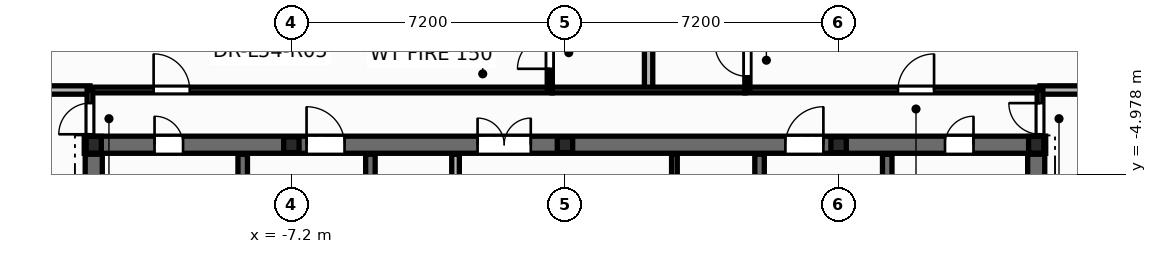
"""IFC4 building model, lengths in metres.
Left out: names, types, materials, properties, quantities, classifications, styles, units other than length and angle.
Written with IfcOpenShell. Run it as: python <this file> out.ifc"""

import sys

from ifc_helpers import new_model, si_unit, direction, frame, frame_2d, origin, origin_2d, place, context, subcontext, project, spatial, rectangle, i_section, extrude, element, fill, save


model = new_model("IFC4")
c1 = context("Model", 3, precision=1e-05, world=origin(), true_north=direction((0.0, 1.0)))
c2 = subcontext(c1, "Body", "Model", "MODEL_VIEW")
j1 = project(units=[si_unit("LENGTHUNIT", "METRE"), si_unit("PLANEANGLEUNIT", "RADIAN")], contexts=[c1])
p1 = place(None, origin())
s1 = spatial("IfcSite", under=j1, at=p1, CompositionType="ELEMENT")
p2 = place(p1, origin())
s2 = spatial("IfcBuilding", under=s1, at=p2, CompositionType="ELEMENT")
p3 = place(p2, frame((0.0, 0.0, 207.3)))
s3 = spatial("IfcBuildingStorey", under=s2, at=p3, CompositionType="ELEMENT", Elevation=207.3)
for number, where, z_axis, x_axis in (
    (1, (12.4, -4.2, 0.0), (0.0, 0.0, 1.0), (1.0, 0.0, 0.0)),
    (2, (-12.4, -4.2, 0.0), (0.0, 0.0, 1.0), (1.0, 0.0, 0.0)),
):
    element("IfcColumn", number, at=place(p3, frame(where, z_axis=z_axis, x_axis=x_axis)), inside=s3, PredefinedType="COLUMN", context=c2, shape_type="SweptSolid", body=[
        extrude(i_section(OverallWidth=0.4, OverallDepth=0.44, WebThickness=0.028, FlangeThickness=0.04, at=origin_2d()), origin(), (0.0, 0.0, 1.0), 3.6),
    ])
for number, where, z_axis, x_axis in (
    (3, (-7.2, -4.2, 0.0), (0.0, 0.0, 1.0), (1.0, 0.0, 0.0)),
    (4, (0.0, -4.2, 0.0), (0.0, 0.0, 1.0), (1.0, 0.0, 0.0)),
    (5, (7.2, -4.2, 0.0), (0.0, 0.0, 1.0), (1.0, 0.0, 0.0)),
):
    element("IfcColumn", number, at=place(p3, frame(where, z_axis=z_axis, x_axis=x_axis)), inside=s3, PredefinedType="PILASTER", context=c2, shape_type="SweptSolid", body=[
        extrude(i_section(OverallWidth=0.405, OverallDepth=0.414, WebThickness=0.022, FlangeThickness=0.032, at=origin_2d()), origin(), (0.0, 0.0, 1.0), 3.6),
    ])
p4 = place(p3, frame((2.88, -5.6, 0.0), z_axis=(0.0, 0.0, 1.0), x_axis=(0.0, 1.0, 0.0)))
e6 = element("IfcWall", 6, at=p4, inside=s3, PredefinedType="PARTITIONING", context=c2, shape_type="SweptSolid", body=[
    extrude(rectangle(XDim=1.15, YDim=0.15, at=frame_2d((0.575, 0.0))), origin(), (0.0, 0.0, 1.0), 3.345),
])
p5 = place(p3, frame((-12.65, -4.2, 0.0), z_axis=(0.0, 0.0, 1.0), x_axis=(1.0, 0.0, 0.0)))
e7 = element("IfcWall", 7, at=p5, inside=s3, PredefinedType="SHEAR", context=c2, shape_type="SweptSolid", body=[
    extrude(rectangle(XDim=25.3, YDim=0.45, at=frame_2d((12.65, 0.0))), origin(), (0.0, 0.0, 1.0), 3.6),
])
p6 = place(p5, frame((1.85, 0.0, 0.0)))
e8 = element("IfcOpeningElement", 8, at=p6, cuts=e7, PredefinedType="OPENING", context=c2, shape_type="SweptSolid", body=[
    extrude(rectangle(XDim=0.756, YDim=2.054, at=frame_2d((0.375, 1.027))), frame((0.0, 0.235, 0.0), z_axis=(0.0, -1.0, 0.0), x_axis=(1.0, 0.0, 0.0)), (0.0, 0.0, 1.0), 0.47),
])
p7 = place(p5, frame((22.65, 0.0, 0.0)))
e9 = element("IfcOpeningElement", 9, at=p7, cuts=e7, PredefinedType="OPENING", context=c2, shape_type="SweptSolid", body=[
    extrude(rectangle(XDim=0.756, YDim=2.054, at=frame_2d((0.375, 1.027))), frame((0.0, 0.235, 0.0), z_axis=(0.0, -1.0, 0.0), x_axis=(1.0, 0.0, 0.0)), (0.0, 0.0, 1.0), 0.47),
])
p8 = place(p5, frame((5.85, 0.0, 0.0)))
e10 = element("IfcOpeningElement", 10, at=p8, cuts=e7, PredefinedType="OPENING", context=c2, shape_type="SweptSolid", body=[
    extrude(rectangle(XDim=1.006, YDim=2.104, at=frame_2d((0.5, 1.052))), frame((0.0, 0.235, 0.0), z_axis=(0.0, -1.0, 0.0), x_axis=(1.0, 0.0, 0.0)), (0.0, 0.0, 1.0), 0.47),
])
p9 = place(p5, frame((10.35, 0.0, 0.0)))
e11 = element("IfcOpeningElement", 11, at=p9, cuts=e7, PredefinedType="OPENING", context=c2, shape_type="SweptSolid", body=[
    extrude(rectangle(XDim=1.406, YDim=2.154, at=frame_2d((0.7, 1.077))), frame((0.0, 0.235, 0.0), z_axis=(0.0, -1.0, 0.0), x_axis=(1.0, 0.0, 0.0)), (0.0, 0.0, 1.0), 0.47),
])
p10 = place(p5, frame((18.45, 0.0, 0.0)))
e12 = element("IfcOpeningElement", 12, at=p10, cuts=e7, PredefinedType="OPENING", context=c2, shape_type="SweptSolid", body=[
    extrude(rectangle(XDim=1.006, YDim=2.104, at=frame_2d((0.5, 1.052))), frame((0.0, 0.235, 0.0), z_axis=(0.0, -1.0, 0.0), x_axis=(1.0, 0.0, 0.0)), (0.0, 0.0, 1.0), 0.47),
])
p11 = place(p3, frame((-8.48, -13.85, 0.0), z_axis=(0.0, 0.0, 1.0), x_axis=(0.0, 1.0, 0.0)))
e13 = element("IfcWall", 13, at=p11, inside=s3, PredefinedType="SHEAR", context=c2, shape_type="SweptSolid", body=[
    extrude(rectangle(XDim=9.4, YDim=0.25, at=frame_2d((4.7, 0.0))), origin(), (0.0, 0.0, 1.0), 3.6),
])
p12 = place(p11, frame((6.95, 0.0, 0.0)))
e14 = element("IfcOpeningElement", 14, at=p12, cuts=e13, PredefinedType="OPENING", context=c2, shape_type="SweptSolid", body=[
    extrude(rectangle(XDim=1.006, YDim=2.104, at=frame_2d((0.5, 1.052))), frame((0.0, 0.135, 0.0), z_axis=(0.0, -1.0, 0.0), x_axis=(1.0, 0.0, 0.0)), (0.0, 0.0, 1.0), 0.27),
])
p13 = place(p3, frame((8.48, -13.85, 0.0), z_axis=(0.0, 0.0, 1.0), x_axis=(0.0, 1.0, 0.0)))
e15 = element("IfcWall", 15, at=p13, inside=s3, PredefinedType="SHEAR", context=c2, shape_type="SweptSolid", body=[
    extrude(rectangle(XDim=9.4, YDim=0.25, at=frame_2d((4.7, 0.0))), origin(), (0.0, 0.0, 1.0), 3.6),
])
p14 = place(p13, frame((6.95, 0.0, 0.0)))
e16 = element("IfcOpeningElement", 16, at=p14, cuts=e15, PredefinedType="OPENING", context=c2, shape_type="SweptSolid", body=[
    extrude(rectangle(XDim=1.006, YDim=2.104, at=frame_2d((0.5, 1.052))), frame((0.0, 0.135, 0.0), z_axis=(0.0, -1.0, 0.0), x_axis=(1.0, 0.0, 0.0)), (0.0, 0.0, 1.0), 0.27),
])
for number, where, z_axis, x_axis in (
    (17, (-5.12, -13.85, 0.0), (0.0, 0.0, 1.0), (0.0, 1.0, 0.0)),
    (18, (5.12, -13.85, 0.0), (0.0, 0.0, 1.0), (0.0, 1.0, 0.0)),
):
    element("IfcWall", number, at=place(p3, frame(where, z_axis=z_axis, x_axis=x_axis)), inside=s3, PredefinedType="SHEAR", context=c2, shape_type="SweptSolid", body=[
        extrude(rectangle(XDim=9.4, YDim=0.25, at=frame_2d((4.7, 0.0))), origin(), (0.0, 0.0, 1.0), 3.6),
    ])
for number, where, z_axis, x_axis in (
    (19, (-12.4, -13.85, 0.0), (0.0, 0.0, 1.0), (0.0, 1.0, 0.0)),
    (20, (12.4, -13.85, 0.0), (0.0, 0.0, 1.0), (0.0, 1.0, 0.0)),
):
    element("IfcWall", number, at=place(p3, frame(where, z_axis=z_axis, x_axis=x_axis)), inside=s3, PredefinedType="SHEAR", context=c2, shape_type="SweptSolid", body=[
        extrude(rectangle(XDim=9.4, YDim=0.45, at=frame_2d((4.7, 0.0))), origin(), (0.0, 0.0, 1.0), 3.6),
    ])
p15 = place(p3, frame((-2.88, -9.45, 0.0), z_axis=(0.0, 0.0, 1.0), x_axis=(0.0, 1.0, 0.0)))
e21 = element("IfcWall", 21, at=p15, inside=s3, PredefinedType="SOLIDWALL", context=c2, shape_type="SweptSolid", body=[
    extrude(rectangle(XDim=5.0, YDim=0.2, at=frame_2d((2.5, 0.0))), origin(), (0.0, 0.0, 1.0), 3.345),
])
p16 = place(p15, frame((2.05, 0.0, 0.0)))
e22 = element("IfcOpeningElement", 22, at=p16, cuts=e21, PredefinedType="OPENING", context=c2, shape_type="SweptSolid", body=[
    extrude(rectangle(XDim=0.926, YDim=2.104, at=frame_2d((0.46, 1.052))), frame((0.0, 0.11, 0.0), z_axis=(0.0, -1.0, 0.0), x_axis=(1.0, 0.0, 0.0)), (0.0, 0.0, 1.0), 0.22),
])
p17 = place(p3, frame((-12.5, -2.76, 0.0), z_axis=(0.0, 0.0, 1.0), x_axis=(1.0, 0.0, 0.0)))
e23 = element("IfcWall", 23, at=p17, inside=s3, PredefinedType="PARTITIONING", context=c2, shape_type="SweptSolid", body=[
    extrude(rectangle(XDim=12.16, YDim=0.15, at=frame_2d((6.08, 0.0))), origin(), (0.0, 0.0, 1.0), 2.32),
])
p18 = place(p17, frame((1.676, 0.0, 0.0)))
e24 = element("IfcOpeningElement", 24, at=p18, cuts=e23, PredefinedType="OPENING", context=c2, shape_type="SweptSolid", body=[
    extrude(rectangle(XDim=0.956, YDim=2.104, at=frame_2d((0.475, 1.052))), frame((0.0, 0.085, 0.0), z_axis=(0.0, -1.0, 0.0), x_axis=(1.0, 0.0, 0.0)), (0.0, 0.0, 1.0), 0.17),
])
p19 = place(p3, frame((4.74, -2.76, 0.0), z_axis=(0.0, 0.0, 1.0), x_axis=(1.0, 0.0, 0.0)))
e25 = element("IfcWall", 25, at=p19, inside=s3, PredefinedType="PARTITIONING", context=c2, shape_type="SweptSolid", body=[
    extrude(rectangle(XDim=7.76, YDim=0.15, at=frame_2d((3.88, 0.0))), origin(), (0.0, 0.0, 1.0), 2.32),
])
p20 = place(p19, frame((4.022, 0.0, 0.0)))
e26 = element("IfcOpeningElement", 26, at=p20, cuts=e25, PredefinedType="OPENING", context=c2, shape_type="SweptSolid", body=[
    extrude(rectangle(XDim=0.956, YDim=2.104, at=frame_2d((0.475, 1.052))), frame((0.0, 0.085, 0.0), z_axis=(0.0, -1.0, 0.0), x_axis=(1.0, 0.0, 0.0)), (0.0, 0.0, 1.0), 0.17),
])
p21 = place(p3, frame((2.2, -2.76, 0.0), z_axis=(0.0, 0.0, 1.0), x_axis=(0.0, 1.0, 0.0)))
e27 = element("IfcWall", 27, at=p21, inside=s3, PredefinedType="PARTITIONING", context=c2, shape_type="SweptSolid", body=[
    extrude(rectangle(XDim=10.94, YDim=0.22, at=frame_2d((5.47, 0.0))), origin(), (0.0, 0.0, 1.0), 2.32),
])
p22 = place(p3, frame((-0.4, -2.76, 0.0), z_axis=(0.0, 0.0, 1.0), x_axis=(0.0, 1.0, 0.0)))
e28 = element("IfcWall", 28, at=p22, inside=s3, PredefinedType="PARTITIONING", context=c2, shape_type="SweptSolid", body=[
    extrude(rectangle(XDim=2.92, YDim=0.135, at=frame_2d((1.46, 0.0))), origin(), (0.0, 0.0, 1.0), 3.345),
])
p23 = place(p22, frame((0.558, 0.0, 0.0)))
e29 = element("IfcOpeningElement", 29, at=p23, cuts=e28, PredefinedType="OPENING", context=c2, shape_type="SweptSolid", body=[
    extrude(rectangle(XDim=0.856, YDim=2.104, at=frame_2d((0.425, 1.052))), frame((0.0, 0.078, 0.0), z_axis=(0.0, -1.0, 0.0), x_axis=(1.0, 0.0, 0.0)), (0.0, 0.0, 1.0), 0.155),
])
p24 = place(p3, frame((4.8, -2.76, 0.0), z_axis=(0.0, 0.0, 1.0), x_axis=(0.0, 1.0, 0.0)))
e30 = element("IfcWall", 30, at=p24, inside=s3, PredefinedType="PARTITIONING", context=c2, shape_type="SweptSolid", body=[
    extrude(rectangle(XDim=2.92, YDim=0.135, at=frame_2d((1.46, 0.0))), origin(), (0.0, 0.0, 1.0), 3.345),
])
p25 = place(p24, frame((0.359, 0.0, 0.0)))
e31 = element("IfcOpeningElement", 31, at=p25, cuts=e30, PredefinedType="OPENING", context=c2, shape_type="SweptSolid", body=[
    extrude(rectangle(XDim=0.856, YDim=2.104, at=frame_2d((0.425, 1.052))), frame((0.0, 0.078, 0.0), z_axis=(0.0, -1.0, 0.0), x_axis=(1.0, 0.0, 0.0)), (0.0, 0.0, 1.0), 0.155),
])
p26 = place(p3, frame((-0.338, -2.76, 0.0), z_axis=(0.0, 0.0, 1.0), x_axis=(1.0, 0.0, 0.0)))
e32 = element("IfcWall", 32, at=p26, inside=s3, PredefinedType="PARTITIONING", context=c2, shape_type="SweptSolid", body=[
    extrude(rectangle(XDim=5.076, YDim=0.15, at=frame_2d((2.538, 0.0))), origin(), (0.0, 0.0, 1.0), 2.32),
])
for number, where, z_axis, x_axis in (
    (33, (-14.926, -2.76, 0.0), (0.0, 0.0, 1.0), (1.0, 0.0, 0.0)),
    (34, (12.5, -2.76, 0.0), (0.0, 0.0, 1.0), (1.0, 0.0, 0.0)),
):
    element("IfcWall", number, at=place(p3, frame(where, z_axis=z_axis, x_axis=x_axis)), inside=s3, PredefinedType="PARTITIONING", context=c2, shape_type="SweptSolid", body=[
        extrude(rectangle(XDim=2.426, YDim=0.22, at=frame_2d((1.213, 0.0))), origin(), (0.0, 0.0, 1.0), 2.62),
    ])
p27 = place(p3, frame((-12.5, -4.24, 0.0), z_axis=(0.0, 0.0, 1.0), x_axis=(0.0, 1.0, 0.0)))
e35 = element("IfcWall", 35, at=p27, inside=s3, PredefinedType="PARTITIONING", context=c2, shape_type="SweptSolid", body=[
    extrude(rectangle(XDim=1.48, YDim=0.15, at=frame_2d((0.74, 0.0))), origin(), (0.0, 0.0, 1.0), 2.32),
])
p28 = place(p27, frame((0.315, 0.0, 0.0)))
e36 = element("IfcOpeningElement", 36, at=p28, cuts=e35, PredefinedType="OPENING", context=c2, shape_type="SweptSolid", body=[
    extrude(rectangle(XDim=0.826, YDim=2.104, at=frame_2d((0.41, 1.052))), frame((0.0, 0.085, 0.0), z_axis=(0.0, -1.0, 0.0), x_axis=(1.0, 0.0, 0.0)), (0.0, 0.0, 1.0), 0.17),
])
p29 = place(p3, frame((12.5, -4.24, 0.0), z_axis=(0.0, 0.0, 1.0), x_axis=(0.0, 1.0, 0.0)))
e37 = element("IfcWall", 37, at=p29, inside=s3, PredefinedType="PARTITIONING", context=c2, shape_type="SweptSolid", body=[
    extrude(rectangle(XDim=1.48, YDim=0.15, at=frame_2d((0.74, 0.0))), origin(), (0.0, 0.0, 1.0), 2.32),
])
p30 = place(p29, frame((0.315, 0.0, 0.0)))
e38 = element("IfcOpeningElement", 38, at=p30, cuts=e37, PredefinedType="OPENING", context=c2, shape_type="SweptSolid", body=[
    extrude(rectangle(XDim=0.826, YDim=2.104, at=frame_2d((0.41, 1.052))), frame((0.0, 0.085, 0.0), z_axis=(0.0, -1.0, 0.0), x_axis=(1.0, 0.0, 0.0)), (0.0, 0.0, 1.0), 0.17),
])
p31 = place(p6, origin())
e39 = element("IfcDoor", 39, at=p31, inside=s3, OperationType="SINGLE_SWING_LEFT", PredefinedType="DOOR", context=c2, shape_type="SweptSolid", body=[
    extrude(rectangle(XDim=0.75, YDim=2.05, at=frame_2d((0.375, 1.025))), frame((0.0, 0.025, 0.0), z_axis=(0.0, -1.0, 0.0), x_axis=(1.0, 0.0, 0.0)), (0.0, 0.0, 1.0), 0.05),
])
fill(e8, e39)
p32 = place(p7, origin())
e40 = element("IfcDoor", 40, at=p32, inside=s3, OperationType="SINGLE_SWING_RIGHT", PredefinedType="DOOR", context=c2, shape_type="SweptSolid", body=[
    extrude(rectangle(XDim=0.75, YDim=2.05, at=frame_2d((0.375, 1.025))), frame((0.0, 0.025, 0.0), z_axis=(0.0, -1.0, 0.0), x_axis=(1.0, 0.0, 0.0)), (0.0, 0.0, 1.0), 0.05),
])
fill(e9, e40)
p33 = place(p8, origin())
e41 = element("IfcDoor", 41, at=p33, inside=s3, OperationType="SINGLE_SWING_LEFT", PredefinedType="DOOR", context=c2, shape_type="SweptSolid", body=[
    extrude(rectangle(XDim=1.0, YDim=2.1, at=frame_2d((0.5, 1.05))), frame((0.0, 0.025, 0.0), z_axis=(0.0, -1.0, 0.0), x_axis=(1.0, 0.0, 0.0)), (0.0, 0.0, 1.0), 0.05),
])
fill(e10, e41)
p34 = place(p9, origin())
e42 = element("IfcDoor", 42, at=p34, inside=s3, OperationType="DOUBLE_DOOR_SINGLE_SWING", PredefinedType="DOOR", context=c2, shape_type="SweptSolid", body=[
    extrude(rectangle(XDim=1.4, YDim=2.15, at=frame_2d((0.7, 1.075))), frame((0.0, 0.025, 0.0), z_axis=(0.0, -1.0, 0.0), x_axis=(1.0, 0.0, 0.0)), (0.0, 0.0, 1.0), 0.05),
])
fill(e11, e42)
p35 = place(p10, origin())
e43 = element("IfcDoor", 43, at=p35, inside=s3, OperationType="SINGLE_SWING_RIGHT", PredefinedType="DOOR", context=c2, shape_type="SweptSolid", body=[
    extrude(rectangle(XDim=1.0, YDim=2.1, at=frame_2d((0.5, 1.05))), frame((0.0, 0.025, 0.0), z_axis=(0.0, -1.0, 0.0), x_axis=(1.0, 0.0, 0.0)), (0.0, 0.0, 1.0), 0.05),
])
fill(e12, e43)
p36 = place(p28, origin())
e44 = element("IfcDoor", 44, at=p36, inside=s3, OperationType="SINGLE_SWING_LEFT", PredefinedType="DOOR", context=c2, shape_type="SweptSolid", body=[
    extrude(rectangle(XDim=0.82, YDim=2.1, at=frame_2d((0.41, 1.05))), frame((0.0, 0.025, 0.0), z_axis=(0.0, -1.0, 0.0), x_axis=(1.0, 0.0, 0.0)), (0.0, 0.0, 1.0), 0.05),
])
fill(e36, e44)
p37 = place(p30, origin())
e45 = element("IfcDoor", 45, at=p37, inside=s3, OperationType="SINGLE_SWING_RIGHT", PredefinedType="DOOR", context=c2, shape_type="SweptSolid", body=[
    extrude(rectangle(XDim=0.82, YDim=2.1, at=frame_2d((0.41, 1.05))), frame((0.0, 0.025, 0.0), z_axis=(0.0, -1.0, 0.0), x_axis=(1.0, 0.0, 0.0)), (0.0, 0.0, 1.0), 0.05),
])
fill(e38, e45)
p38 = place(p23, origin())
e46 = element("IfcDoor", 46, at=p38, inside=s3, OperationType="SINGLE_SWING_LEFT", PredefinedType="DOOR", context=c2, shape_type="SweptSolid", body=[
    extrude(rectangle(XDim=0.85, YDim=2.1, at=frame_2d((0.425, 1.05))), frame((0.0, 0.025, 0.0), z_axis=(0.0, -1.0, 0.0), x_axis=(1.0, 0.0, 0.0)), (0.0, 0.0, 1.0), 0.05),
])
fill(e29, e46)
p39 = place(p18, origin())
e47 = element("IfcDoor", 47, at=p39, inside=s3, OperationType="SINGLE_SWING_LEFT", PredefinedType="DOOR", context=c2, shape_type="SweptSolid", body=[
    extrude(rectangle(XDim=0.95, YDim=2.1, at=frame_2d((0.475, 1.05))), frame((0.0, 0.025, 0.0), z_axis=(0.0, -1.0, 0.0), x_axis=(1.0, 0.0, 0.0)), (0.0, 0.0, 1.0), 0.05),
])
fill(e24, e47)
p40 = place(p25, origin())
e48 = element("IfcDoor", 48, at=p40, inside=s3, OperationType="SINGLE_SWING_RIGHT", PredefinedType="DOOR", context=c2, shape_type="SweptSolid", body=[
    extrude(rectangle(XDim=0.85, YDim=2.1, at=frame_2d((0.425, 1.05))), frame((0.0, 0.025, 0.0), z_axis=(0.0, -1.0, 0.0), x_axis=(1.0, 0.0, 0.0)), (0.0, 0.0, 1.0), 0.05),
])
fill(e31, e48)
p41 = place(p20, origin())
e49 = element("IfcDoor", 49, at=p41, inside=s3, OperationType="SINGLE_SWING_RIGHT", PredefinedType="DOOR", context=c2, shape_type="SweptSolid", body=[
    extrude(rectangle(XDim=0.95, YDim=2.1, at=frame_2d((0.475, 1.05))), frame((0.0, 0.025, 0.0), z_axis=(0.0, -1.0, 0.0), x_axis=(1.0, 0.0, 0.0)), (0.0, 0.0, 1.0), 0.05),
])
fill(e26, e49)
save(model, sys.argv[1])
